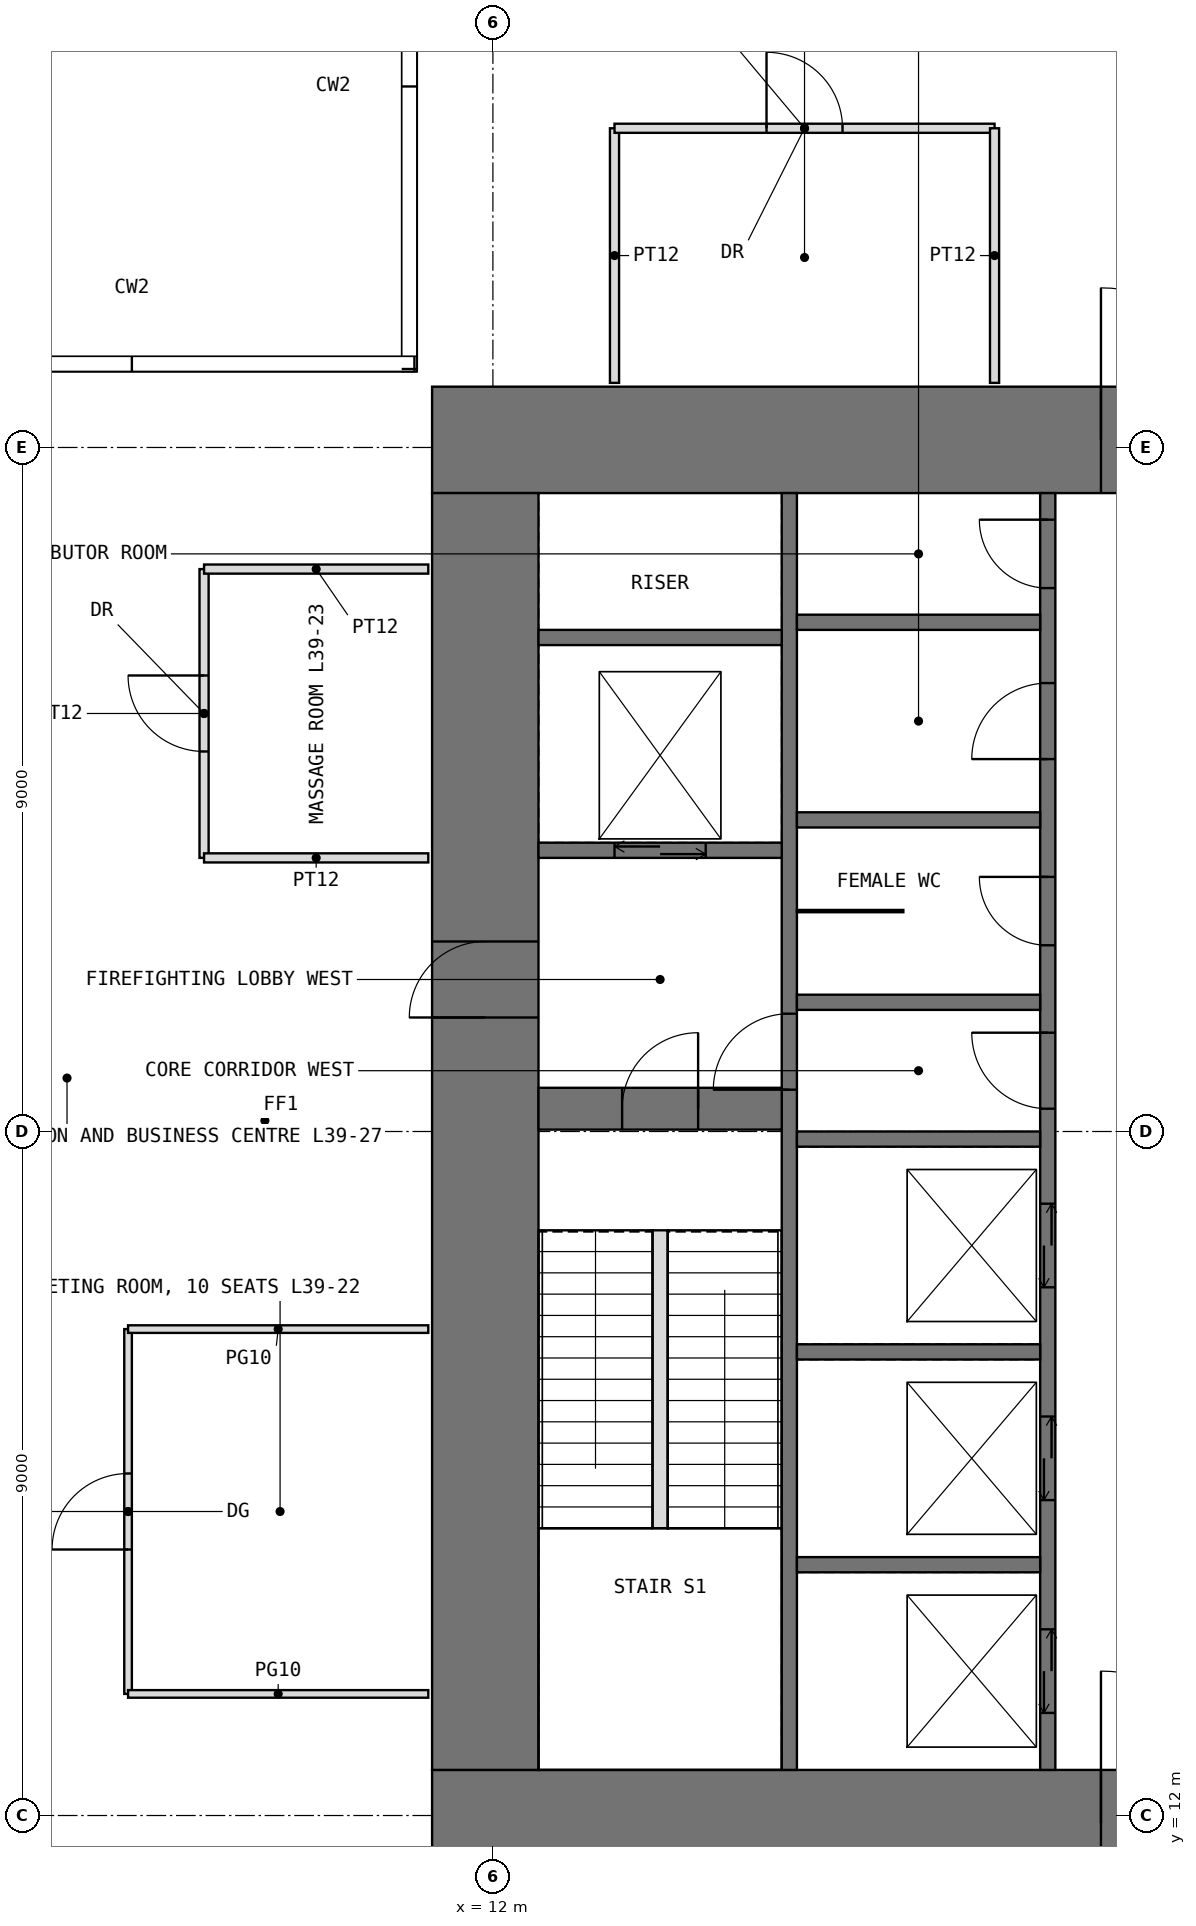
"""IFC4 building model, lengths in metres.
Left out: names, types, materials, properties, quantities, classifications, styles, units other than length and angle.
Written with IfcOpenShell. Run it as: python <this file> out.ifc"""

import sys

from ifc_helpers import new_model, si_unit, direction, frame, frame_2d, origin, place, context, subcontext, project, spatial, rectangle, extrude, element, fill, save


model = new_model("IFC4")
c1 = context("Model", 3, precision=1e-05, world=origin(), true_north=direction((0.0, 1.0)))
c2 = subcontext(c1, "Body", "Model", "MODEL_VIEW")
j1 = project(units=[si_unit("LENGTHUNIT", "METRE"), si_unit("PLANEANGLEUNIT", "RADIAN")], contexts=[c1])
p1 = place(None, origin())
s1 = spatial("IfcSite", under=j1, at=p1, CompositionType="ELEMENT")
p2 = place(p1, origin())
s2 = spatial("IfcBuilding", under=s1, at=p2, CompositionType="ELEMENT")
p3 = place(p2, frame((0.0, 0.0, 165.5)))
s3 = spatial("IfcBuildingStorey", under=s2, at=p3, CompositionType="ELEMENT", Elevation=165.5)
p4 = place(p3, frame((11.2, 11.9, -0.05), z_axis=(0.0, 0.0, 1.0), x_axis=(1.0, 0.0, 0.0)))
e1 = element("IfcWall", 1, at=p4, inside=s3, PredefinedType="SHEAR", context=c2, shape_type="SweptSolid", body=[
    extrude(rectangle(XDim=19.6, YDim=1.4, at=frame_2d((9.8, 0.0))), origin(), (0.0, 0.0, 1.0), 5.0),
])
p5 = place(p4, frame((8.8, 0.0, 0.05)))
e2 = element("IfcOpeningElement", 2, at=p5, cuts=e1, PredefinedType="OPENING", context=c2, shape_type="SweptSolid", body=[
    extrude(rectangle(XDim=2.0, YDim=2.2, at=frame_2d((1.0, 1.1))), frame((0.0, 0.71, 0.0), z_axis=(0.0, -1.0, 0.0), x_axis=(1.0, 0.0, 0.0)), (0.0, 0.0, 1.0), 1.42),
])
p6 = place(p3, frame((11.2, 30.1, -0.05), z_axis=(0.0, 0.0, 1.0), x_axis=(1.0, 0.0, 0.0)))
e3 = element("IfcWall", 3, at=p6, inside=s3, PredefinedType="SHEAR", context=c2, shape_type="SweptSolid", body=[
    extrude(rectangle(XDim=19.6, YDim=1.4, at=frame_2d((9.8, 0.0))), origin(), (0.0, 0.0, 1.0), 5.0),
])
p7 = place(p6, frame((8.8, 0.0, 0.05)))
e4 = element("IfcOpeningElement", 4, at=p7, cuts=e3, PredefinedType="OPENING", context=c2, shape_type="SweptSolid", body=[
    extrude(rectangle(XDim=2.0, YDim=2.2, at=frame_2d((1.0, 1.1))), frame((0.0, 0.71, 0.0), z_axis=(0.0, -1.0, 0.0), x_axis=(1.0, 0.0, 0.0)), (0.0, 0.0, 1.0), 1.42),
])
p8 = place(p3, frame((11.9, 12.6, -0.05), z_axis=(0.0, 0.0, 1.0), x_axis=(0.0, 1.0, 0.0)))
e5 = element("IfcWall", 5, at=p8, inside=s3, PredefinedType="SHEAR", context=c2, shape_type="SweptSolid", body=[
    extrude(rectangle(XDim=16.8, YDim=1.4, at=frame_2d((8.4, 0.0))), origin(), (0.0, 0.0, 1.0), 5.0),
])
p9 = place(p8, frame((9.9, 0.0, 0.05)))
e6 = element("IfcOpeningElement", 6, at=p9, cuts=e5, PredefinedType="OPENING", context=c2, shape_type="SweptSolid", body=[
    extrude(rectangle(XDim=1.0, YDim=2.2, at=frame_2d((0.5, 1.1))), frame((0.0, 0.71, 0.0), z_axis=(0.0, -1.0, 0.0), x_axis=(1.0, 0.0, 0.0)), (0.0, 0.0, 1.0), 1.42),
])
p10 = place(p3, frame((15.9, 12.6, -0.05), z_axis=(0.0, 0.0, 1.0), x_axis=(0.0, 1.0, 0.0)))
e7 = element("IfcWall", 7, at=p10, inside=s3, PredefinedType="SHEAR", context=c2, shape_type="SweptSolid", body=[
    extrude(rectangle(XDim=16.8, YDim=0.2, at=frame_2d((8.4, 0.0))), origin(), (0.0, 0.0, 1.0), 5.0),
])
p11 = place(p10, frame((8.95, 0.0, 0.05)))
e8 = element("IfcOpeningElement", 8, at=p11, cuts=e7, PredefinedType="OPENING", context=c2, shape_type="SweptSolid", body=[
    extrude(rectangle(XDim=1.0, YDim=2.2, at=frame_2d((0.5, 1.1))), frame((0.0, 0.11, 0.0), z_axis=(0.0, -1.0, 0.0), x_axis=(1.0, 0.0, 0.0)), (0.0, 0.0, 1.0), 0.22),
])
p12 = place(p3, frame((19.3, 12.6, -0.05), z_axis=(0.0, 0.0, 1.0), x_axis=(0.0, 1.0, 0.0)))
e9 = element("IfcWall", 9, at=p12, inside=s3, PredefinedType="SHEAR", context=c2, shape_type="SweptSolid", body=[
    extrude(rectangle(XDim=16.8, YDim=0.2, at=frame_2d((8.4, 0.0))), origin(), (0.0, 0.0, 1.0), 5.0),
])
p13 = place(p12, frame((8.7, 0.0, 0.05)))
e10 = element("IfcOpeningElement", 10, at=p13, cuts=e9, PredefinedType="OPENING", context=c2, shape_type="SweptSolid", body=[
    extrude(rectangle(XDim=1.0, YDim=2.2, at=frame_2d((0.5, 1.1))), frame((0.0, 0.11, 0.0), z_axis=(0.0, -1.0, 0.0), x_axis=(1.0, 0.0, 0.0)), (0.0, 0.0, 1.0), 0.22),
])
p14 = place(p12, frame((10.85, 0.0, 0.05)))
e11 = element("IfcOpeningElement", 11, at=p14, cuts=e9, PredefinedType="OPENING", context=c2, shape_type="SweptSolid", body=[
    extrude(rectangle(XDim=0.9, YDim=2.2, at=frame_2d((0.45, 1.1))), frame((0.0, 0.11, 0.0), z_axis=(0.0, -1.0, 0.0), x_axis=(1.0, 0.0, 0.0)), (0.0, 0.0, 1.0), 0.22),
])
p15 = place(p12, frame((13.3, 0.0, 0.05)))
e12 = element("IfcOpeningElement", 12, at=p15, cuts=e9, PredefinedType="OPENING", context=c2, shape_type="SweptSolid", body=[
    extrude(rectangle(XDim=1.0, YDim=2.2, at=frame_2d((0.5, 1.1))), frame((0.0, 0.11, 0.0), z_axis=(0.0, -1.0, 0.0), x_axis=(1.0, 0.0, 0.0)), (0.0, 0.0, 1.0), 0.22),
])
p16 = place(p12, frame((15.55, 0.0, 0.05)))
e13 = element("IfcOpeningElement", 13, at=p16, cuts=e9, PredefinedType="OPENING", context=c2, shape_type="SweptSolid", body=[
    extrude(rectangle(XDim=0.9, YDim=2.2, at=frame_2d((0.45, 1.1))), frame((0.0, 0.11, 0.0), z_axis=(0.0, -1.0, 0.0), x_axis=(1.0, 0.0, 0.0)), (0.0, 0.0, 1.0), 0.22),
])
p17 = place(p12, frame((0.75, 0.0, 0.05)))
e14 = element("IfcOpeningElement", 14, at=p17, cuts=e9, PredefinedType="OPENING", context=c2, shape_type="SweptSolid", body=[
    extrude(rectangle(XDim=1.1, YDim=2.2, at=frame_2d((0.55, 1.1))), frame((0.0, 0.11, 0.0), z_axis=(0.0, -1.0, 0.0), x_axis=(1.0, 0.0, 0.0)), (0.0, 0.0, 1.0), 0.22),
])
p18 = place(p12, frame((3.55, 0.0, 0.05)))
e15 = element("IfcOpeningElement", 15, at=p18, cuts=e9, PredefinedType="OPENING", context=c2, shape_type="SweptSolid", body=[
    extrude(rectangle(XDim=1.1, YDim=2.2, at=frame_2d((0.55, 1.1))), frame((0.0, 0.11, 0.0), z_axis=(0.0, -1.0, 0.0), x_axis=(1.0, 0.0, 0.0)), (0.0, 0.0, 1.0), 0.22),
])
p19 = place(p12, frame((6.35, 0.0, 0.05)))
e16 = element("IfcOpeningElement", 16, at=p19, cuts=e9, PredefinedType="OPENING", context=c2, shape_type="SweptSolid", body=[
    extrude(rectangle(XDim=1.1, YDim=2.2, at=frame_2d((0.55, 1.1))), frame((0.0, 0.11, 0.0), z_axis=(0.0, -1.0, 0.0), x_axis=(1.0, 0.0, 0.0)), (0.0, 0.0, 1.0), 0.22),
])
p20 = place(p3, frame((12.6, 21.3, -0.05), z_axis=(0.0, 0.0, 1.0), x_axis=(1.0, 0.0, 0.0)))
e17 = element("IfcWall", 17, at=p20, inside=s3, PredefinedType="SHEAR", context=c2, shape_type="SweptSolid", body=[
    extrude(rectangle(XDim=3.2, YDim=0.55, at=frame_2d((1.6, 0.0))), origin(), (0.0, 0.0, 1.0), 5.0),
])
p21 = place(p20, frame((1.1, 0.0, 0.05)))
e18 = element("IfcOpeningElement", 18, at=p21, cuts=e17, PredefinedType="OPENING", context=c2, shape_type="SweptSolid", body=[
    extrude(rectangle(XDim=1.0, YDim=2.2, at=frame_2d((0.5, 1.1))), frame((0.0, 0.285, 0.0), z_axis=(0.0, -1.0, 0.0), x_axis=(1.0, 0.0, 0.0)), (0.0, 0.0, 1.0), 0.57),
])
p22 = place(p3, frame((12.6, 24.7, -0.05), z_axis=(0.0, 0.0, 1.0), x_axis=(1.0, 0.0, 0.0)))
e19 = element("IfcWall", 19, at=p22, inside=s3, PredefinedType="SHEAR", context=c2, shape_type="SweptSolid", body=[
    extrude(rectangle(XDim=3.2, YDim=0.2, at=frame_2d((1.6, 0.0))), origin(), (0.0, 0.0, 1.0), 5.0),
])
p23 = place(p22, frame((1.0, 0.0, 0.05)))
e20 = element("IfcOpeningElement", 20, at=p23, cuts=e19, PredefinedType="OPENING", context=c2, shape_type="SweptSolid", body=[
    extrude(rectangle(XDim=1.2, YDim=2.2, at=frame_2d((0.6, 1.1))), frame((0.0, 0.11, 0.0), z_axis=(0.0, -1.0, 0.0), x_axis=(1.0, 0.0, 0.0)), (0.0, 0.0, 1.0), 0.22),
])
for number, where, z_axis, x_axis in (
    (21, (12.6, 27.5, -0.05), (0.0, 0.0, 1.0), (1.0, 0.0, 0.0)),
    (22, (16.0, 15.3, -0.05), (0.0, 0.0, 1.0), (1.0, 0.0, 0.0)),
    (23, (16.0, 18.1, -0.05), (0.0, 0.0, 1.0), (1.0, 0.0, 0.0)),
    (24, (16.0, 20.9, -0.05), (0.0, 0.0, 1.0), (1.0, 0.0, 0.0)),
    (25, (16.0, 22.7, -0.05), (0.0, 0.0, 1.0), (1.0, 0.0, 0.0)),
    (26, (16.0, 25.1, -0.05), (0.0, 0.0, 1.0), (1.0, 0.0, 0.0)),
    (27, (16.0, 27.7, -0.05), (0.0, 0.0, 1.0), (1.0, 0.0, 0.0)),
):
    element("IfcWall", number, at=place(p3, frame(where, z_axis=z_axis, x_axis=x_axis)), inside=s3, PredefinedType="SHEAR", context=c2, shape_type="SweptSolid", body=[
        extrude(rectangle(XDim=3.2, YDim=0.2, at=frame_2d((1.6, 0.0))), origin(), (0.0, 0.0, 1.0), 5.0),
    ])
p24 = place(p3, frame((16.0, 23.9, 0.0), z_axis=(0.0, 0.0, 1.0), x_axis=(1.0, 0.0, 0.0)))
e28 = element("IfcWall", 28, at=p24, inside=s3, PredefinedType="PARTITIONING", context=c2, shape_type="SweptSolid", body=[
    extrude(rectangle(XDim=1.4, YDim=0.03, at=frame_2d((0.7, 0.0))), origin(), (0.0, 0.0, 1.0), 4.75),
])
p25 = place(p3, frame((7.2, 13.6, 0.0), z_axis=(0.0, 0.0, 1.0), x_axis=(0.0, 1.0, 0.0)))
e29 = element("IfcWall", 29, at=p25, inside=s3, PredefinedType="PARTITIONING", context=c2, shape_type="SweptSolid", body=[
    extrude(rectangle(XDim=4.8, YDim=0.1, at=frame_2d((2.4, 0.0))), origin(), (0.0, 0.0, 1.0), 4.75),
])
p26 = place(p25, frame((1.9, 0.0, 0.0)))
e30 = element("IfcOpeningElement", 30, at=p26, cuts=e29, PredefinedType="OPENING", context=c2, shape_type="SweptSolid", body=[
    extrude(rectangle(XDim=1.0, YDim=2.4, at=frame_2d((0.5, 1.2))), frame((0.0, 0.06, 0.0), z_axis=(0.0, -1.0, 0.0), x_axis=(1.0, 0.0, 0.0)), (0.0, 0.0, 1.0), 0.12),
])
for number, where, z_axis, x_axis in (
    (31, (7.2, 13.6, 0.0), (0.0, 0.0, 1.0), (1.0, 0.0, 0.0)),
    (32, (7.2, 18.4, 0.0), (0.0, 0.0, 1.0), (1.0, 0.0, 0.0)),
):
    element("IfcWall", number, at=place(p3, frame(where, z_axis=z_axis, x_axis=x_axis)), inside=s3, PredefinedType="PARTITIONING", context=c2, shape_type="SweptSolid", body=[
        extrude(rectangle(XDim=3.95, YDim=0.1, at=frame_2d((1.975, 0.0))), origin(), (0.0, 0.0, 1.0), 4.75),
    ])
p27 = place(p3, frame((8.2, 24.6, 0.0), z_axis=(0.0, 0.0, 1.0), x_axis=(0.0, 1.0, 0.0)))
e33 = element("IfcWall", 33, at=p27, inside=s3, PredefinedType="PARTITIONING", context=c2, shape_type="SweptSolid", body=[
    extrude(rectangle(XDim=3.8, YDim=0.12, at=frame_2d((1.9, 0.0))), origin(), (0.0, 0.0, 1.0), 4.75),
])
p28 = place(p27, frame((1.4, 0.0, 0.0)))
e34 = element("IfcOpeningElement", 34, at=p28, cuts=e33, PredefinedType="OPENING", context=c2, shape_type="SweptSolid", body=[
    extrude(rectangle(XDim=1.0, YDim=2.2, at=frame_2d((0.5, 1.1))), frame((0.0, 0.07, 0.0), z_axis=(0.0, -1.0, 0.0), x_axis=(1.0, 0.0, 0.0)), (0.0, 0.0, 1.0), 0.14),
])
for number, where, z_axis, x_axis in (
    (35, (8.2, 24.6, 0.0), (0.0, 0.0, 1.0), (1.0, 0.0, 0.0)),
    (36, (8.2, 28.4, 0.0), (0.0, 0.0, 1.0), (1.0, 0.0, 0.0)),
):
    element("IfcWall", number, at=place(p3, frame(where, z_axis=z_axis, x_axis=x_axis)), inside=s3, PredefinedType="PARTITIONING", context=c2, shape_type="SweptSolid", body=[
        extrude(rectangle(XDim=2.95, YDim=0.12, at=frame_2d((1.475, 0.0))), origin(), (0.0, 0.0, 1.0), 4.75),
    ])
p29 = place(p3, frame((13.6, 30.85, 0.0), z_axis=(0.0, 0.0, 1.0), x_axis=(0.0, 1.0, 0.0)))
e37 = element("IfcWall", 37, at=p29, inside=s3, PredefinedType="PARTITIONING", context=c2, shape_type="SweptSolid", body=[
    extrude(rectangle(XDim=3.35, YDim=0.12, at=frame_2d((1.675, 0.0))), origin(), (0.0, 0.0, 1.0), 4.75),
])
p30 = place(p3, frame((13.6, 34.2, 0.0), z_axis=(0.0, 0.0, 1.0), x_axis=(1.0, 0.0, 0.0)))
e38 = element("IfcWall", 38, at=p30, inside=s3, PredefinedType="PARTITIONING", context=c2, shape_type="SweptSolid", body=[
    extrude(rectangle(XDim=5.0, YDim=0.12, at=frame_2d((2.5, 0.0))), origin(), (0.0, 0.0, 1.0), 4.75),
])
p31 = place(p30, frame((2.0, 0.0, 0.0)))
e39 = element("IfcOpeningElement", 39, at=p31, cuts=e38, PredefinedType="OPENING", context=c2, shape_type="SweptSolid", body=[
    extrude(rectangle(XDim=1.0, YDim=2.2, at=frame_2d((0.5, 1.1))), frame((0.0, 0.07, 0.0), z_axis=(0.0, -1.0, 0.0), x_axis=(1.0, 0.0, 0.0)), (0.0, 0.0, 1.0), 0.14),
])
p32 = place(p3, frame((18.6, 30.85, 0.0), z_axis=(0.0, 0.0, 1.0), x_axis=(0.0, 1.0, 0.0)))
e40 = element("IfcWall", 40, at=p32, inside=s3, PredefinedType="PARTITIONING", context=c2, shape_type="SweptSolid", body=[
    extrude(rectangle(XDim=3.35, YDim=0.12, at=frame_2d((1.675, 0.0))), origin(), (0.0, 0.0, 1.0), 4.75),
])
p33 = place(p3, frame((14.2, 15.78, 0.0), z_axis=(0.0, 0.0, 1.0), x_axis=(0.0, 1.0, 0.0)))
e41 = element("IfcWall", 41, at=p33, inside=s3, PredefinedType="PARTITIONING", context=c2, shape_type="SweptSolid", body=[
    extrude(rectangle(XDim=3.92, YDim=0.2, at=frame_2d((1.96, 0.0))), origin(), (0.0, 0.0, 1.0), 5.0),
])
p34 = place(p5, origin())
e42 = element("IfcDoor", 42, at=p34, inside=s3, OperationType="DOUBLE_DOOR_SINGLE_SWING", PredefinedType="DOOR", context=c2, shape_type="SweptSolid", body=[
    extrude(rectangle(XDim=2.0, YDim=2.2, at=frame_2d((1.0, 1.1))), frame((0.0, 0.025, 0.0), z_axis=(0.0, -1.0, 0.0), x_axis=(1.0, 0.0, 0.0)), (0.0, 0.0, 1.0), 0.05),
])
fill(e2, e42)
p35 = place(p7, origin())
e43 = element("IfcDoor", 43, at=p35, inside=s3, OperationType="DOUBLE_DOOR_SINGLE_SWING", PredefinedType="DOOR", context=c2, shape_type="SweptSolid", body=[
    extrude(rectangle(XDim=2.0, YDim=2.2, at=frame_2d((1.0, 1.1))), frame((0.0, 0.025, 0.0), z_axis=(0.0, -1.0, 0.0), x_axis=(1.0, 0.0, 0.0)), (0.0, 0.0, 1.0), 0.05),
])
fill(e4, e43)
p36 = place(p9, origin())
e44 = element("IfcDoor", 44, at=p36, inside=s3, OperationType="SINGLE_SWING_LEFT", PredefinedType="DOOR", context=c2, shape_type="SweptSolid", body=[
    extrude(rectangle(XDim=1.0, YDim=2.2, at=frame_2d((0.5, 1.1))), frame((0.0, 0.025, 0.0), z_axis=(0.0, -1.0, 0.0), x_axis=(1.0, 0.0, 0.0)), (0.0, 0.0, 1.0), 0.05),
])
fill(e6, e44)
p37 = place(p21, origin())
e45 = element("IfcDoor", 45, at=p37, inside=s3, OperationType="SINGLE_SWING_RIGHT", PredefinedType="DOOR", context=c2, shape_type="SweptSolid", body=[
    extrude(rectangle(XDim=1.0, YDim=2.2, at=frame_2d((0.5, 1.1))), frame((0.0, 0.025, 0.0), z_axis=(0.0, -1.0, 0.0), x_axis=(1.0, 0.0, 0.0)), (0.0, 0.0, 1.0), 0.05),
])
fill(e18, e45)
p38 = place(p11, origin())
e46 = element("IfcDoor", 46, at=p38, inside=s3, OperationType="SINGLE_SWING_LEFT", PredefinedType="DOOR", context=c2, shape_type="SweptSolid", body=[
    extrude(rectangle(XDim=1.0, YDim=2.2, at=frame_2d((0.5, 1.1))), frame((0.0, 0.025, 0.0), z_axis=(0.0, -1.0, 0.0), x_axis=(1.0, 0.0, 0.0)), (0.0, 0.0, 1.0), 0.05),
])
fill(e8, e46)
p39 = place(p13, origin())
e47 = element("IfcDoor", 47, at=p39, inside=s3, OperationType="SINGLE_SWING_RIGHT", PredefinedType="DOOR", context=c2, shape_type="SweptSolid", body=[
    extrude(rectangle(XDim=1.0, YDim=2.2, at=frame_2d((0.5, 1.1))), frame((0.0, 0.025, 0.0), z_axis=(0.0, -1.0, 0.0), x_axis=(1.0, 0.0, 0.0)), (0.0, 0.0, 1.0), 0.05),
])
fill(e10, e47)
p40 = place(p14, origin())
e48 = element("IfcDoor", 48, at=p40, inside=s3, OperationType="SINGLE_SWING_RIGHT", PredefinedType="DOOR", context=c2, shape_type="SweptSolid", body=[
    extrude(rectangle(XDim=0.9, YDim=2.2, at=frame_2d((0.45, 1.1))), frame((0.0, 0.025, 0.0), z_axis=(0.0, -1.0, 0.0), x_axis=(1.0, 0.0, 0.0)), (0.0, 0.0, 1.0), 0.05),
])
fill(e11, e48)
p41 = place(p15, origin())
e49 = element("IfcDoor", 49, at=p41, inside=s3, OperationType="SINGLE_SWING_LEFT", PredefinedType="DOOR", context=c2, shape_type="SweptSolid", body=[
    extrude(rectangle(XDim=1.0, YDim=2.2, at=frame_2d((0.5, 1.1))), frame((0.0, 0.025, 0.0), z_axis=(0.0, -1.0, 0.0), x_axis=(1.0, 0.0, 0.0)), (0.0, 0.0, 1.0), 0.05),
])
fill(e12, e49)
p42 = place(p16, origin())
e50 = element("IfcDoor", 50, at=p42, inside=s3, OperationType="SINGLE_SWING_RIGHT", PredefinedType="DOOR", context=c2, shape_type="SweptSolid", body=[
    extrude(rectangle(XDim=0.9, YDim=2.2, at=frame_2d((0.45, 1.1))), frame((0.0, 0.025, 0.0), z_axis=(0.0, -1.0, 0.0), x_axis=(1.0, 0.0, 0.0)), (0.0, 0.0, 1.0), 0.05),
])
fill(e13, e50)
p43 = place(p31, origin())
e51 = element("IfcDoor", 51, at=p43, inside=s3, OperationType="SINGLE_SWING_LEFT", PredefinedType="DOOR", context=c2, shape_type="SweptSolid", body=[
    extrude(rectangle(XDim=1.0, YDim=2.2, at=frame_2d((0.5, 1.1))), frame((0.0, 0.025, 0.0), z_axis=(0.0, -1.0, 0.0), x_axis=(1.0, 0.0, 0.0)), (0.0, 0.0, 1.0), 0.05),
])
fill(e39, e51)
p44 = place(p26, origin())
e52 = element("IfcDoor", 52, at=p44, inside=s3, OperationType="SINGLE_SWING_LEFT", PredefinedType="DOOR", context=c2, shape_type="SweptSolid", body=[
    extrude(rectangle(XDim=1.0, YDim=2.4, at=frame_2d((0.5, 1.2))), frame((0.0, 0.025, 0.0), z_axis=(0.0, -1.0, 0.0), x_axis=(1.0, 0.0, 0.0)), (0.0, 0.0, 1.0), 0.05),
])
fill(e30, e52)
p45 = place(p28, origin())
e53 = element("IfcDoor", 53, at=p45, inside=s3, OperationType="SINGLE_SWING_RIGHT", PredefinedType="DOOR", context=c2, shape_type="SweptSolid", body=[
    extrude(rectangle(XDim=1.0, YDim=2.2, at=frame_2d((0.5, 1.1))), frame((0.0, 0.025, 0.0), z_axis=(0.0, -1.0, 0.0), x_axis=(1.0, 0.0, 0.0)), (0.0, 0.0, 1.0), 0.05),
])
fill(e34, e53)
p46 = place(p17, origin())
e54 = element("IfcDoor", 54, at=p46, inside=s3, OperationType="DOUBLE_DOOR_SLIDING", PredefinedType="DOOR", context=c2, shape_type="SweptSolid", body=[
    extrude(rectangle(XDim=1.1, YDim=2.2, at=frame_2d((0.55, 1.1))), frame((0.0, 0.025, 0.0), z_axis=(0.0, -1.0, 0.0), x_axis=(1.0, 0.0, 0.0)), (0.0, 0.0, 1.0), 0.05),
])
fill(e14, e54)
p47 = place(p18, origin())
e55 = element("IfcDoor", 55, at=p47, inside=s3, OperationType="DOUBLE_DOOR_SLIDING", PredefinedType="DOOR", context=c2, shape_type="SweptSolid", body=[
    extrude(rectangle(XDim=1.1, YDim=2.2, at=frame_2d((0.55, 1.1))), frame((0.0, 0.025, 0.0), z_axis=(0.0, -1.0, 0.0), x_axis=(1.0, 0.0, 0.0)), (0.0, 0.0, 1.0), 0.05),
])
fill(e15, e55)
p48 = place(p19, origin())
e56 = element("IfcDoor", 56, at=p48, inside=s3, OperationType="DOUBLE_DOOR_SLIDING", PredefinedType="DOOR", context=c2, shape_type="SweptSolid", body=[
    extrude(rectangle(XDim=1.1, YDim=2.2, at=frame_2d((0.55, 1.1))), frame((0.0, 0.025, 0.0), z_axis=(0.0, -1.0, 0.0), x_axis=(1.0, 0.0, 0.0)), (0.0, 0.0, 1.0), 0.05),
])
fill(e16, e56)
p49 = place(p23, origin())
e57 = element("IfcDoor", 57, at=p49, inside=s3, OperationType="DOUBLE_DOOR_SLIDING", PredefinedType="DOOR", context=c2, shape_type="SweptSolid", body=[
    extrude(rectangle(XDim=1.2, YDim=2.2, at=frame_2d((0.6, 1.1))), frame((0.0, 0.025, 0.0), z_axis=(0.0, -1.0, 0.0), x_axis=(1.0, 0.0, 0.0)), (0.0, 0.0, 1.0), 0.05),
])
fill(e20, e57)
save(model, sys.argv[1])
